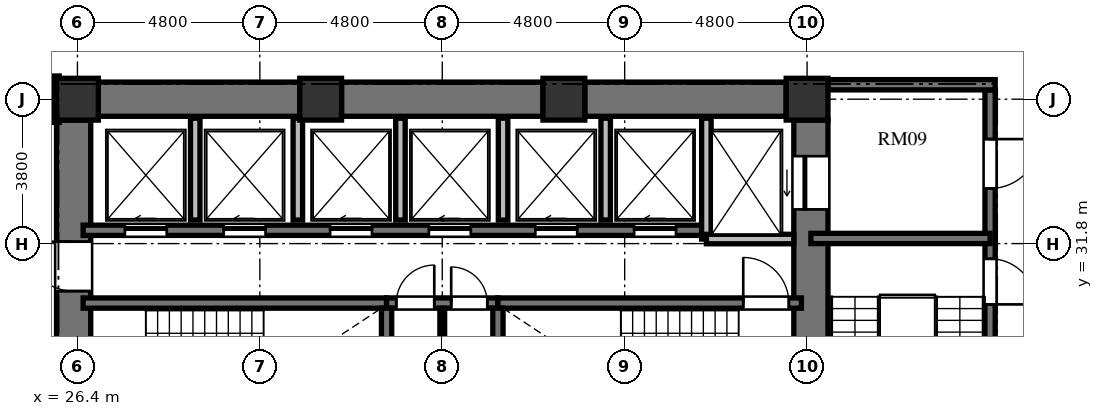
"""IFC4 building model, lengths in metres.
Left out: names, types, materials, properties, quantities, classifications, styles, units other than length and angle.
Written with IfcOpenShell. Run it as: python <this file> out.ifc"""

import sys

from ifc_helpers import new_model, si_unit, direction, frame, frame_2d, origin, origin_2d, place, context, subcontext, project, spatial, rectangle, extrude, element, fill, save


model = new_model("IFC4")
c1 = context("Model", 3, precision=1e-05, world=origin(), true_north=direction((0.0, 1.0)))
c2 = subcontext(c1, "Body", "Model", "MODEL_VIEW")
j1 = project(units=[si_unit("LENGTHUNIT", "METRE"), si_unit("PLANEANGLEUNIT", "RADIAN")], contexts=[c1])
p1 = place(None, origin())
s1 = spatial("IfcSite", under=j1, at=p1, CompositionType="ELEMENT")
p2 = place(p1, origin())
s2 = spatial("IfcBuilding", under=s1, at=p2, CompositionType="ELEMENT")
p3 = place(p2, frame((0.0, 0.0, 65.328)))
s3 = spatial("IfcBuildingStorey", under=s2, at=p3, CompositionType="ELEMENT", Elevation=65.328)
for number, where, z_axis, x_axis in (
    (1, (45.6, 35.6, 0.0), (0.0, 0.0, 1.0), (1.0, 0.0, 0.0)),
    (2, (39.2, 35.6, 0.0), (0.0, 0.0, 1.0), (1.0, 0.0, 0.0)),
    (3, (32.8, 35.6, 0.0), (0.0, 0.0, 1.0), (1.0, 0.0, 0.0)),
    (4, (26.4, 35.6, 0.0), (0.0, 0.0, 1.0), (1.0, 0.0, 0.0)),
):
    element("IfcColumn", number, at=place(p3, frame(where, z_axis=z_axis, x_axis=x_axis)), inside=s3, PredefinedType="COLUMN", context=c2, shape_type="SweptSolid", body=[
        extrude(rectangle(XDim=1.1, YDim=1.1, at=origin_2d()), origin(), (0.0, 0.0, 1.0), 3.648),
    ])
p4 = place(p3, frame((26.3, 20.95, 0.0), z_axis=(0.0, 0.0, 1.0), x_axis=(0.0, 1.0, 0.0)))
e5 = element("IfcWall", 5, at=p4, inside=s3, PredefinedType="SHEAR", context=c2, shape_type="SweptSolid", body=[
    extrude(rectangle(XDim=14.1, YDim=0.9, at=frame_2d((7.05, 0.0))), origin(), (0.0, 0.0, 1.0), 3.648),
])
p5 = place(p4, frame((6.5, 0.0, 0.0)))
e6 = element("IfcOpeningElement", 6, at=p5, cuts=e5, PredefinedType="OPENING", context=c2, shape_type="SweptSolid", body=[
    extrude(rectangle(XDim=1.2, YDim=2.15, at=frame_2d((0.6, 1.075))), frame((0.0, 0.46, 0.0), z_axis=(0.0, -1.0, 0.0), x_axis=(1.0, 0.0, 0.0)), (0.0, 0.0, 1.0), 0.92),
])
p6 = place(p4, frame((9.6, 0.0, 0.0)))
e7 = element("IfcOpeningElement", 7, at=p6, cuts=e5, PredefinedType="OPENING", context=c2, shape_type="SweptSolid", body=[
    extrude(rectangle(XDim=1.3, YDim=2.2, at=frame_2d((0.65, 1.1))), frame((0.0, 0.46, 0.0), z_axis=(0.0, -1.0, 0.0), x_axis=(1.0, 0.0, 0.0)), (0.0, 0.0, 1.0), 0.92),
])
p7 = place(p4, frame((3.26, 0.0, 0.0)))
e8 = element("IfcOpeningElement", 8, at=p7, cuts=e5, PredefinedType="OPENING", context=c2, shape_type="SweptSolid", body=[
    extrude(rectangle(XDim=1.3, YDim=2.2, at=frame_2d((0.65, 1.1))), frame((0.0, 0.46, 0.0), z_axis=(0.0, -1.0, 0.0), x_axis=(1.0, 0.0, 0.0)), (0.0, 0.0, 1.0), 0.92),
])
p8 = place(p3, frame((45.7, 20.95, 0.0), z_axis=(0.0, 0.0, 1.0), x_axis=(0.0, 1.0, 0.0)))
e9 = element("IfcWall", 9, at=p8, inside=s3, PredefinedType="SHEAR", context=c2, shape_type="SweptSolid", body=[
    extrude(rectangle(XDim=14.1, YDim=0.9, at=frame_2d((7.05, 0.0))), origin(), (0.0, 0.0, 1.0), 3.648),
])
p9 = place(p8, frame((11.75, 0.0, 0.0)))
e10 = element("IfcOpeningElement", 10, at=p9, cuts=e9, PredefinedType="OPENING", context=c2, shape_type="SweptSolid", body=[
    extrude(rectangle(XDim=1.4, YDim=2.3, at=frame_2d((0.7, 1.15))), frame((0.0, 0.46, 0.0), z_axis=(0.0, -1.0, 0.0), x_axis=(1.0, 0.0, 0.0)), (0.0, 0.0, 1.0), 0.92),
])
p10 = place(p8, frame((0.95, 0.0, 0.0)))
e11 = element("IfcOpeningElement", 11, at=p10, cuts=e9, PredefinedType="OPENING", context=c2, shape_type="SweptSolid", body=[
    extrude(rectangle(XDim=1.4, YDim=2.3, at=frame_2d((0.7, 1.15))), frame((0.0, 0.46, 0.0), z_axis=(0.0, -1.0, 0.0), x_axis=(1.0, 0.0, 0.0)), (0.0, 0.0, 1.0), 0.92),
])
p11 = place(p3, frame((26.95, 35.6, 0.0), z_axis=(0.0, 0.0, 1.0), x_axis=(1.0, 0.0, 0.0)))
e12 = element("IfcWall", 12, at=p11, inside=s3, PredefinedType="SHEAR", context=c2, shape_type="SweptSolid", body=[
    extrude(rectangle(XDim=5.3, YDim=0.9, at=frame_2d((2.65, 0.0))), origin(), (0.0, 0.0, 1.0), 3.648),
])
p12 = place(p3, frame((33.35, 35.6, 0.0), z_axis=(0.0, 0.0, 1.0), x_axis=(1.0, 0.0, 0.0)))
e13 = element("IfcWall", 13, at=p12, inside=s3, PredefinedType="SHEAR", context=c2, shape_type="SweptSolid", body=[
    extrude(rectangle(XDim=5.3, YDim=0.9, at=frame_2d((2.65, 0.0))), origin(), (0.0, 0.0, 1.0), 3.648),
])
p13 = place(p3, frame((39.75, 35.6, 0.0), z_axis=(0.0, 0.0, 1.0), x_axis=(1.0, 0.0, 0.0)))
e14 = element("IfcWall", 14, at=p13, inside=s3, PredefinedType="SHEAR", context=c2, shape_type="SweptSolid", body=[
    extrude(rectangle(XDim=5.3, YDim=0.9, at=frame_2d((2.65, 0.0))), origin(), (0.0, 0.0, 1.0), 3.648),
])
p14 = place(p3, frame((26.55, 30.235, 0.0), z_axis=(0.0, 0.0, 1.0), x_axis=(1.0, 0.0, 0.0)))
e15 = element("IfcWall", 15, at=p14, inside=s3, PredefinedType="SHEAR", context=c2, shape_type="SweptSolid", body=[
    extrude(rectangle(XDim=7.985, YDim=0.27, at=frame_2d((3.992, 0.0))), origin(), (0.0, 0.0, 1.0), 3.648),
])
p15 = place(p3, frame((34.535, 30.235, 0.0), z_axis=(0.0, 0.0, 1.0), x_axis=(1.0, 0.0, 0.0)))
e16 = element("IfcWall", 16, at=p15, inside=s3, PredefinedType="SHEAR", context=c2, shape_type="SweptSolid", body=[
    extrude(rectangle(XDim=2.93, YDim=0.27, at=frame_2d((1.465, 0.0))), origin(), (0.0, 0.0, 1.0), 3.648),
])
p16 = place(p15, frame((0.255, 0.0, 0.0)))
e17 = element("IfcOpeningElement", 17, at=p16, cuts=e16, PredefinedType="OPENING", context=c2, shape_type="SweptSolid", body=[
    extrude(rectangle(XDim=1.0, YDim=2.1, at=frame_2d((0.5, 1.05))), frame((0.0, 0.145, 0.0), z_axis=(0.0, -1.0, 0.0), x_axis=(1.0, 0.0, 0.0)), (0.0, 0.0, 1.0), 0.29),
])
p17 = place(p15, frame((1.7, 0.0, 0.0)))
e18 = element("IfcOpeningElement", 18, at=p17, cuts=e16, PredefinedType="OPENING", context=c2, shape_type="SweptSolid", body=[
    extrude(rectangle(XDim=0.95, YDim=2.1, at=frame_2d((0.475, 1.05))), frame((0.0, 0.145, 0.0), z_axis=(0.0, -1.0, 0.0), x_axis=(1.0, 0.0, 0.0)), (0.0, 0.0, 1.0), 0.29),
])
p18 = place(p3, frame((37.465, 30.235, 0.0), z_axis=(0.0, 0.0, 1.0), x_axis=(1.0, 0.0, 0.0)))
e19 = element("IfcWall", 19, at=p18, inside=s3, PredefinedType="SHEAR", context=c2, shape_type="SweptSolid", body=[
    extrude(rectangle(XDim=7.985, YDim=0.27, at=frame_2d((3.992, 0.0))), origin(), (0.0, 0.0, 1.0), 3.648),
])
p19 = place(p18, frame((6.455, 0.0, 0.0)))
e20 = element("IfcOpeningElement", 20, at=p19, cuts=e19, PredefinedType="OPENING", context=c2, shape_type="SweptSolid", body=[
    extrude(rectangle(XDim=1.2, YDim=2.15, at=frame_2d((0.6, 1.075))), frame((0.0, 0.145, 0.0), z_axis=(0.0, -1.0, 0.0), x_axis=(1.0, 0.0, 0.0)), (0.0, 0.0, 1.0), 0.29),
])
for number, where, z_axis, x_axis in (
    (21, (34.535, 26.02, 0.0), (0.0, 0.0, 1.0), (0.0, 1.0, 0.0)),
    (22, (37.465, 26.02, 0.0), (0.0, 0.0, 1.0), (0.0, 1.0, 0.0)),
):
    element("IfcWall", number, at=place(p3, frame(where, z_axis=z_axis, x_axis=x_axis)), inside=s3, PredefinedType="SHEAR", context=c2, shape_type="SweptSolid", body=[
        extrude(rectangle(XDim=4.08, YDim=0.27, at=frame_2d((2.04, 0.0))), origin(), (0.0, 0.0, 1.0), 3.648),
    ])
p20 = place(p3, frame((36.0, 26.02, 0.0), z_axis=(0.0, 0.0, 1.0), x_axis=(0.0, 1.0, 0.0)))
e23 = element("IfcWall", 23, at=p20, inside=s3, PredefinedType="PARTITIONING", context=c2, shape_type="SweptSolid", body=[
    extrude(rectangle(XDim=4.08, YDim=0.125, at=frame_2d((2.04, 0.0))), origin(), (0.0, 0.0, 1.0), 3.428),
])
p21 = place(p3, frame((26.55, 32.15, 0.0), z_axis=(0.0, 0.0, 1.0), x_axis=(1.0, 0.0, 0.0)))
e24 = element("IfcWall", 24, at=p21, inside=s3, PredefinedType="SHEAR", context=c2, shape_type="SweptSolid", body=[
    extrude(rectangle(XDim=16.4, YDim=0.27, at=frame_2d((8.2, 0.0))), origin(), (0.0, 0.0, 1.0), 3.648),
])
p22 = place(p21, frame((1.1, 0.0, 0.0)))
e25 = element("IfcOpeningElement", 25, at=p22, cuts=e24, PredefinedType="OPENING", context=c2, shape_type="SweptSolid", body=[
    extrude(rectangle(XDim=1.1, YDim=2.2, at=frame_2d((0.55, 1.1))), frame((0.0, 0.145, 0.0), z_axis=(0.0, -1.0, 0.0), x_axis=(1.0, 0.0, 0.0)), (0.0, 0.0, 1.0), 0.29),
])
p23 = place(p21, frame((3.7, 0.0, 0.0)))
e26 = element("IfcOpeningElement", 26, at=p23, cuts=e24, PredefinedType="OPENING", context=c2, shape_type="SweptSolid", body=[
    extrude(rectangle(XDim=1.1, YDim=2.2, at=frame_2d((0.55, 1.1))), frame((0.0, 0.145, 0.0), z_axis=(0.0, -1.0, 0.0), x_axis=(1.0, 0.0, 0.0)), (0.0, 0.0, 1.0), 0.29),
])
p24 = place(p21, frame((6.5, 0.0, 0.0)))
e27 = element("IfcOpeningElement", 27, at=p24, cuts=e24, PredefinedType="OPENING", context=c2, shape_type="SweptSolid", body=[
    extrude(rectangle(XDim=1.1, YDim=2.2, at=frame_2d((0.55, 1.1))), frame((0.0, 0.145, 0.0), z_axis=(0.0, -1.0, 0.0), x_axis=(1.0, 0.0, 0.0)), (0.0, 0.0, 1.0), 0.29),
])
p25 = place(p21, frame((9.1, 0.0, 0.0)))
e28 = element("IfcOpeningElement", 28, at=p25, cuts=e24, PredefinedType="OPENING", context=c2, shape_type="SweptSolid", body=[
    extrude(rectangle(XDim=1.1, YDim=2.2, at=frame_2d((0.55, 1.1))), frame((0.0, 0.145, 0.0), z_axis=(0.0, -1.0, 0.0), x_axis=(1.0, 0.0, 0.0)), (0.0, 0.0, 1.0), 0.29),
])
p26 = place(p21, frame((11.9, 0.0, 0.0)))
e29 = element("IfcOpeningElement", 29, at=p26, cuts=e24, PredefinedType="OPENING", context=c2, shape_type="SweptSolid", body=[
    extrude(rectangle(XDim=1.1, YDim=2.2, at=frame_2d((0.55, 1.1))), frame((0.0, 0.145, 0.0), z_axis=(0.0, -1.0, 0.0), x_axis=(1.0, 0.0, 0.0)), (0.0, 0.0, 1.0), 0.29),
])
p27 = place(p21, frame((14.5, 0.0, 0.0)))
e30 = element("IfcOpeningElement", 30, at=p27, cuts=e24, PredefinedType="OPENING", context=c2, shape_type="SweptSolid", body=[
    extrude(rectangle(XDim=1.1, YDim=2.2, at=frame_2d((0.55, 1.1))), frame((0.0, 0.145, 0.0), z_axis=(0.0, -1.0, 0.0), x_axis=(1.0, 0.0, 0.0)), (0.0, 0.0, 1.0), 0.29),
])
p28 = place(p3, frame((42.95, 31.92, 0.0), z_axis=(0.0, 0.0, 1.0), x_axis=(0.0, 1.0, 0.0)))
e31 = element("IfcWall", 31, at=p28, inside=s3, PredefinedType="SOLIDWALL", context=c2, shape_type="SweptSolid", body=[
    extrude(rectangle(XDim=3.18, YDim=0.25, at=frame_2d((1.59, 0.0))), origin(), (0.0, 0.0, 1.0), 3.428),
])
p29 = place(p3, frame((42.95, 31.92, 0.0), z_axis=(0.0, 0.0, 1.0), x_axis=(1.0, 0.0, 0.0)))
e32 = element("IfcWall", 32, at=p29, inside=s3, PredefinedType="SOLIDWALL", context=c2, shape_type="SweptSolid", body=[
    extrude(rectangle(XDim=2.3, YDim=0.25, at=frame_2d((1.15, 0.0))), origin(), (0.0, 0.0, 1.0), 3.428),
])
for number, where, z_axis, x_axis in (
    (33, (29.5, 32.42, 0.0), (0.0, 0.0, 1.0), (0.0, 1.0, 0.0)),
    (34, (32.2, 32.42, 0.0), (0.0, 0.0, 1.0), (0.0, 1.0, 0.0)),
    (35, (34.9, 32.42, 0.0), (0.0, 0.0, 1.0), (0.0, 1.0, 0.0)),
    (36, (37.6, 32.42, 0.0), (0.0, 0.0, 1.0), (0.0, 1.0, 0.0)),
    (37, (40.3, 32.42, 0.0), (0.0, 0.0, 1.0), (0.0, 1.0, 0.0)),
):
    element("IfcWall", number, at=place(p3, frame(where, z_axis=z_axis, x_axis=x_axis)), inside=s3, PredefinedType="SOLIDWALL", context=c2, shape_type="SweptSolid", body=[
        extrude(rectangle(XDim=2.68, YDim=0.25, at=frame_2d((1.34, 0.0))), origin(), (0.0, 0.0, 1.0), 3.428),
    ])
p30 = place(p3, frame((50.415, 35.845, 0.0), z_axis=(0.0, 0.0, 1.0), x_axis=(0.0, -1.0, 0.0)))
e38 = element("IfcWall", 38, at=p30, inside=s3, PredefinedType="SHEAR", context=c2, shape_type="SweptSolid", body=[
    extrude(rectangle(XDim=15.825, YDim=0.27, at=frame_2d((7.913, 0.0))), origin(), (0.0, 0.0, 1.0), 3.648),
])
p31 = place(p30, frame((4.445, 0.0, 0.0)))
e39 = element("IfcOpeningElement", 39, at=p31, cuts=e38, PredefinedType="OPENING", context=c2, shape_type="SweptSolid", body=[
    extrude(rectangle(XDim=1.2, YDim=2.15, at=frame_2d((0.6, 1.075))), frame((0.0, 0.145, 0.0), z_axis=(0.0, -1.0, 0.0), x_axis=(1.0, 0.0, 0.0)), (0.0, 0.0, 1.0), 0.29),
])
p32 = place(p30, frame((1.295, 0.0, 0.0)))
e40 = element("IfcOpeningElement", 40, at=p32, cuts=e38, PredefinedType="OPENING", context=c2, shape_type="SweptSolid", body=[
    extrude(rectangle(XDim=1.3, YDim=2.2, at=frame_2d((0.65, 1.1))), frame((0.0, 0.145, 0.0), z_axis=(0.0, -1.0, 0.0), x_axis=(1.0, 0.0, 0.0)), (0.0, 0.0, 1.0), 0.29),
])
p33 = place(p30, frame((13.095, 0.0, 0.0)))
e41 = element("IfcOpeningElement", 41, at=p33, cuts=e38, PredefinedType="OPENING", context=c2, shape_type="SweptSolid", body=[
    extrude(rectangle(XDim=1.3, YDim=2.2, at=frame_2d((0.65, 1.1))), frame((0.0, 0.145, 0.0), z_axis=(0.0, -1.0, 0.0), x_axis=(1.0, 0.0, 0.0)), (0.0, 0.0, 1.0), 0.29),
])
p34 = place(p3, frame((46.15, 35.98, 0.0), z_axis=(0.0, 0.0, 1.0), x_axis=(1.0, 0.0, 0.0)))
e42 = element("IfcWall", 42, at=p34, inside=s3, PredefinedType="SHEAR", context=c2, shape_type="SweptSolid", body=[
    extrude(rectangle(XDim=4.4, YDim=0.27, at=frame_2d((2.2, 0.0))), origin(), (0.0, 0.0, 1.0), 3.648),
])
p35 = place(p3, frame((45.7, 31.935, 0.0), z_axis=(0.0, 0.0, 1.0), x_axis=(1.0, 0.0, 0.0)))
e43 = element("IfcWall", 43, at=p35, inside=s3, PredefinedType="SHEAR", context=c2, shape_type="SweptSolid", body=[
    extrude(rectangle(XDim=4.715, YDim=0.27, at=frame_2d((2.357, 0.0))), origin(), (0.0, 0.0, 1.0), 3.648),
])
p36 = place(p3, frame((25.83, 36.21, 0.0), z_axis=(0.0, 0.0, 1.0), x_axis=(0.0, -1.0, 0.0)))
e44 = element("IfcWall", 44, at=p36, inside=s3, PredefinedType="PARTITIONING", context=c2, shape_type="SweptSolid", body=[
    extrude(rectangle(XDim=1.22, YDim=0.18, at=frame_2d((0.61, 0.0))), origin(), (0.0, 0.0, 1.0), 3.428),
])
p37 = place(p19, origin())
e45 = element("IfcDoor", 45, at=p37, inside=s3, OperationType="SINGLE_SWING_LEFT", PredefinedType="DOOR", context=c2, shape_type="SweptSolid", body=[
    extrude(rectangle(XDim=1.2, YDim=2.15, at=frame_2d((0.6, 1.075))), frame((0.0, 0.025, 0.0), z_axis=(0.0, -1.0, 0.0), x_axis=(1.0, 0.0, 0.0)), (0.0, 0.0, 1.0), 0.05),
])
fill(e20, e45)
p38 = place(p16, origin())
e46 = element("IfcDoor", 46, at=p38, inside=s3, OperationType="SINGLE_SWING_RIGHT", PredefinedType="DOOR", context=c2, shape_type="SweptSolid", body=[
    extrude(rectangle(XDim=1.0, YDim=2.1, at=frame_2d((0.5, 1.05))), frame((0.0, 0.025, 0.0), z_axis=(0.0, -1.0, 0.0), x_axis=(1.0, 0.0, 0.0)), (0.0, 0.0, 1.0), 0.05),
])
fill(e17, e46)
p39 = place(p17, origin())
e47 = element("IfcDoor", 47, at=p39, inside=s3, OperationType="SINGLE_SWING_LEFT", PredefinedType="DOOR", context=c2, shape_type="SweptSolid", body=[
    extrude(rectangle(XDim=0.95, YDim=2.1, at=frame_2d((0.475, 1.05))), frame((0.0, 0.025, 0.0), z_axis=(0.0, -1.0, 0.0), x_axis=(1.0, 0.0, 0.0)), (0.0, 0.0, 1.0), 0.05),
])
fill(e18, e47)
p40 = place(p6, origin())
e48 = element("IfcDoor", 48, at=p40, inside=s3, OperationType="SINGLE_SWING_RIGHT", PredefinedType="DOOR", context=c2, shape_type="SweptSolid", body=[
    extrude(rectangle(XDim=1.3, YDim=2.2, at=frame_2d((0.65, 1.1))), frame((0.0, 0.025, 0.0), z_axis=(0.0, -1.0, 0.0), x_axis=(1.0, 0.0, 0.0)), (0.0, 0.0, 1.0), 0.05),
])
fill(e7, e48)
p41 = place(p22, origin())
e49 = element("IfcDoor", 49, at=p41, inside=s3, OperationType="SLIDING_TO_LEFT", PredefinedType="DOOR", context=c2, shape_type="SweptSolid", body=[
    extrude(rectangle(XDim=1.1, YDim=2.2, at=frame_2d((0.55, 1.1))), frame((0.0, 0.025, 0.0), z_axis=(0.0, -1.0, 0.0), x_axis=(1.0, 0.0, 0.0)), (0.0, 0.0, 1.0), 0.05),
])
fill(e25, e49)
p42 = place(p23, origin())
e50 = element("IfcDoor", 50, at=p42, inside=s3, OperationType="SLIDING_TO_LEFT", PredefinedType="DOOR", context=c2, shape_type="SweptSolid", body=[
    extrude(rectangle(XDim=1.1, YDim=2.2, at=frame_2d((0.55, 1.1))), frame((0.0, 0.025, 0.0), z_axis=(0.0, -1.0, 0.0), x_axis=(1.0, 0.0, 0.0)), (0.0, 0.0, 1.0), 0.05),
])
fill(e26, e50)
p43 = place(p24, origin())
e51 = element("IfcDoor", 51, at=p43, inside=s3, OperationType="SLIDING_TO_LEFT", PredefinedType="DOOR", context=c2, shape_type="SweptSolid", body=[
    extrude(rectangle(XDim=1.1, YDim=2.2, at=frame_2d((0.55, 1.1))), frame((0.0, 0.025, 0.0), z_axis=(0.0, -1.0, 0.0), x_axis=(1.0, 0.0, 0.0)), (0.0, 0.0, 1.0), 0.05),
])
fill(e27, e51)
p44 = place(p25, origin())
e52 = element("IfcDoor", 52, at=p44, inside=s3, OperationType="SLIDING_TO_LEFT", PredefinedType="DOOR", context=c2, shape_type="SweptSolid", body=[
    extrude(rectangle(XDim=1.1, YDim=2.2, at=frame_2d((0.55, 1.1))), frame((0.0, 0.025, 0.0), z_axis=(0.0, -1.0, 0.0), x_axis=(1.0, 0.0, 0.0)), (0.0, 0.0, 1.0), 0.05),
])
fill(e28, e52)
p45 = place(p26, origin())
e53 = element("IfcDoor", 53, at=p45, inside=s3, OperationType="SLIDING_TO_LEFT", PredefinedType="DOOR", context=c2, shape_type="SweptSolid", body=[
    extrude(rectangle(XDim=1.1, YDim=2.2, at=frame_2d((0.55, 1.1))), frame((0.0, 0.025, 0.0), z_axis=(0.0, -1.0, 0.0), x_axis=(1.0, 0.0, 0.0)), (0.0, 0.0, 1.0), 0.05),
])
fill(e29, e53)
p46 = place(p27, origin())
e54 = element("IfcDoor", 54, at=p46, inside=s3, OperationType="SLIDING_TO_LEFT", PredefinedType="DOOR", context=c2, shape_type="SweptSolid", body=[
    extrude(rectangle(XDim=1.1, YDim=2.2, at=frame_2d((0.55, 1.1))), frame((0.0, 0.025, 0.0), z_axis=(0.0, -1.0, 0.0), x_axis=(1.0, 0.0, 0.0)), (0.0, 0.0, 1.0), 0.05),
])
fill(e30, e54)
p47 = place(p9, origin())
e55 = element("IfcDoor", 55, at=p47, inside=s3, OperationType="SLIDING_TO_LEFT", PredefinedType="DOOR", context=c2, shape_type="SweptSolid", body=[
    extrude(rectangle(XDim=1.4, YDim=2.3, at=frame_2d((0.7, 1.15))), frame((0.0, 0.025, 0.0), z_axis=(0.0, -1.0, 0.0), x_axis=(1.0, 0.0, 0.0)), (0.0, 0.0, 1.0), 0.05),
])
fill(e10, e55)
p48 = place(p31, origin())
e56 = element("IfcDoor", 56, at=p48, inside=s3, OperationType="SINGLE_SWING_RIGHT", PredefinedType="DOOR", context=c2, shape_type="SweptSolid", body=[
    extrude(rectangle(XDim=1.2, YDim=2.15, at=frame_2d((0.6, 1.075))), frame((0.0, 0.025, 0.0), z_axis=(0.0, -1.0, 0.0), x_axis=(1.0, 0.0, 0.0)), (0.0, 0.0, 1.0), 0.05),
])
fill(e39, e56)
p49 = place(p32, origin())
e57 = element("IfcDoor", 57, at=p49, inside=s3, OperationType="SINGLE_SWING_LEFT", PredefinedType="DOOR", context=c2, shape_type="SweptSolid", body=[
    extrude(rectangle(XDim=1.3, YDim=2.2, at=frame_2d((0.65, 1.1))), frame((0.0, 0.025, 0.0), z_axis=(0.0, -1.0, 0.0), x_axis=(1.0, 0.0, 0.0)), (0.0, 0.0, 1.0), 0.05),
])
fill(e40, e57)
save(model, sys.argv[1])
